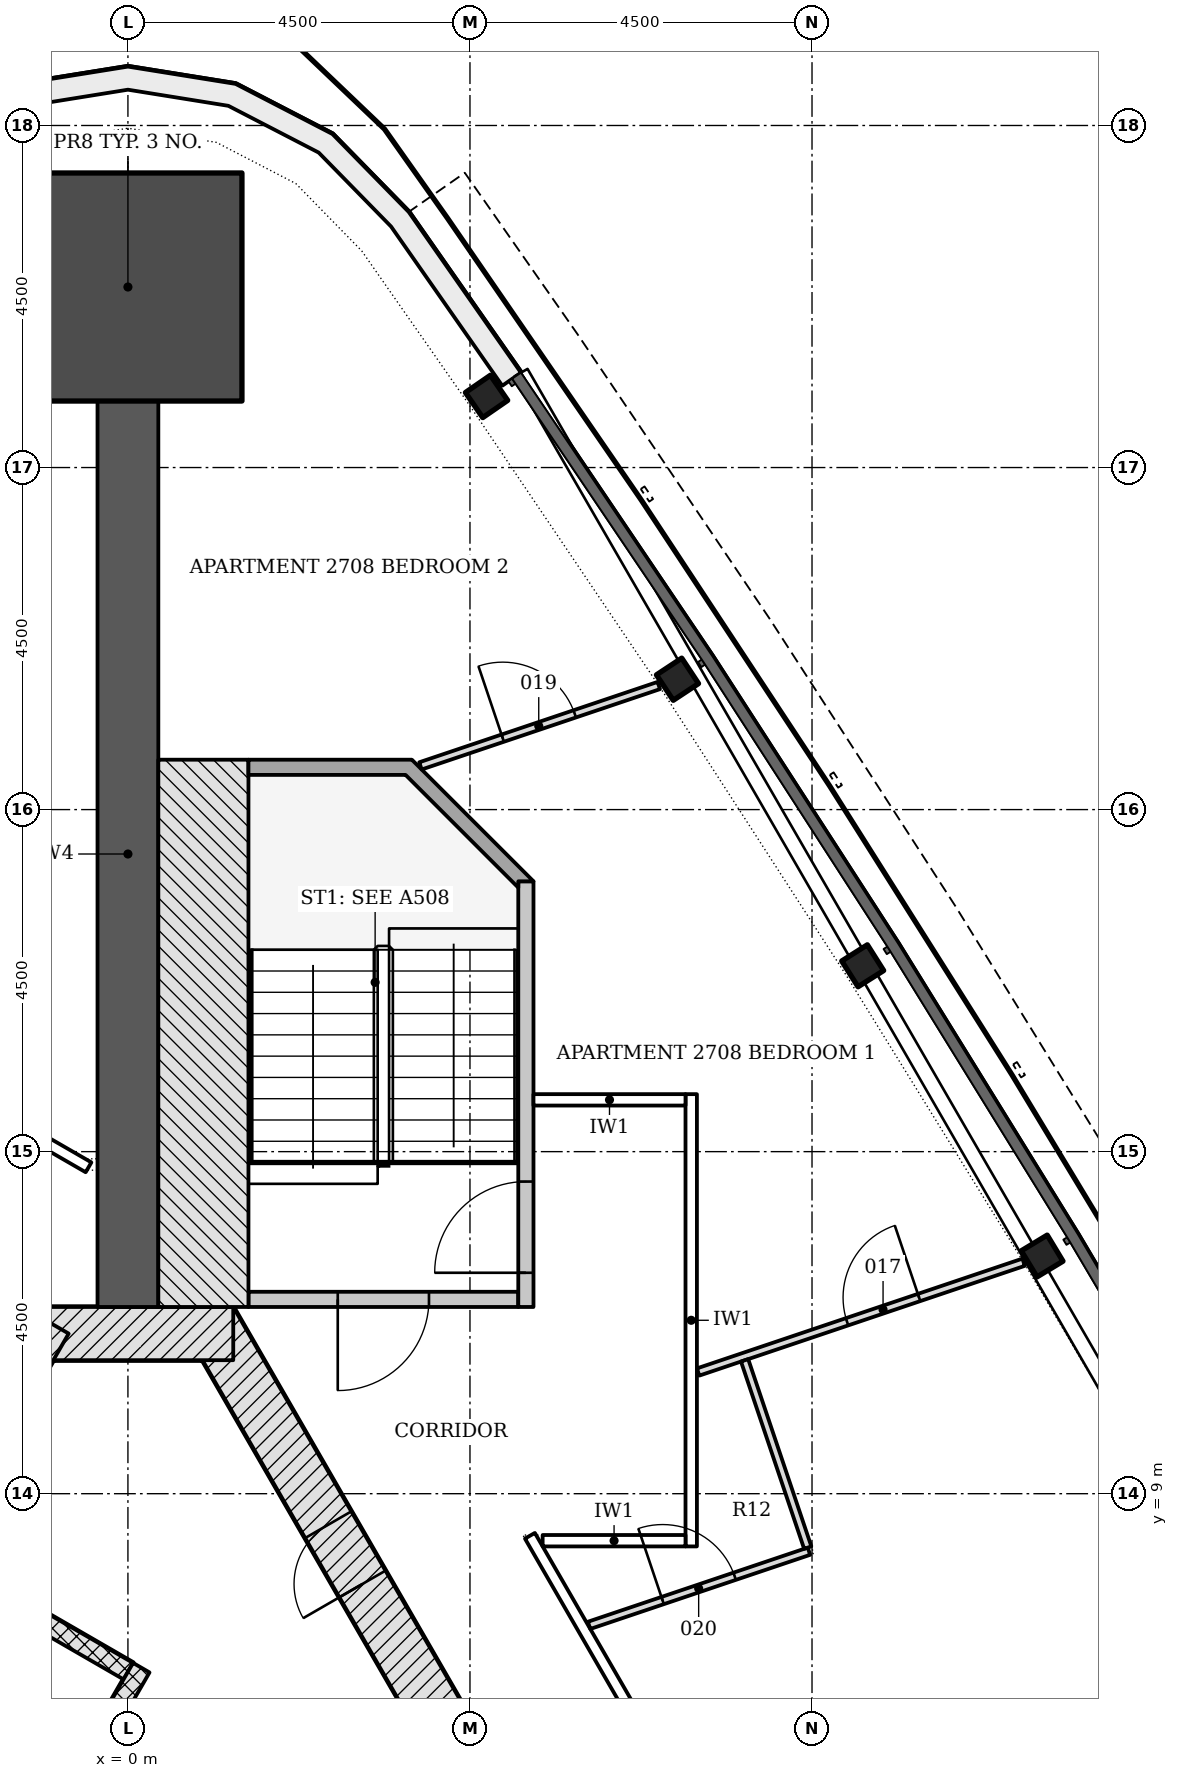
"""IFC4 building model, lengths in metres.
Left out: names, types, materials, properties, quantities, classifications, styles, units other than length and angle.
Written with IfcOpenShell. Run it as: python <this file> out.ifc"""

import sys

from ifc_helpers import new_model, si_unit, direction, frame, frame_2d, origin, origin_2d, place, context, subcontext, project, spatial, polyline, rectangle, i_section, outline, extrude, element, fill, save


model = new_model("IFC4")
c1 = context("Model", 3, precision=1e-05, world=origin(), true_north=direction((0.0, 1.0)))
c2 = subcontext(c1, "Body", "Model", "MODEL_VIEW")
j1 = project(units=[si_unit("LENGTHUNIT", "METRE"), si_unit("PLANEANGLEUNIT", "RADIAN")], contexts=[c1])
p1 = place(None, origin())
s1 = spatial("IfcSite", under=j1, at=p1, CompositionType="ELEMENT")
p2 = place(p1, origin())
s2 = spatial("IfcBuilding", under=s1, at=p2, CompositionType="ELEMENT")
p3 = place(p2, frame((0.0, 0.0, 105.9)))
s3 = spatial("IfcBuildingStorey", under=s2, at=p3, CompositionType="ELEMENT", Elevation=105.9)
p4 = place(p3, frame((10.311, -4.703, -0.2), z_axis=(0.0, 0.0, 1.0), x_axis=(-0.500001446645, 0.866024568562, 0.0)))
e1 = element("IfcWall", 1, at=p4, inside=s3, PredefinedType="SHEAR", context=c2, shape_type="SweptSolid", body=[
    extrude(rectangle(XDim=18.458, YDim=0.7, at=frame_2d((9.229, 0.0))), origin(), (0.0, 0.0, 1.0), 3.6),
])
p5 = place(p4, frame((10.5, 0.0, 0.2)))
e2 = element("IfcOpeningElement", 2, at=p5, cuts=e1, PredefinedType="OPENING", context=c2, shape_type="SweptSolid", body=[
    extrude(rectangle(XDim=1.0, YDim=2.1, at=frame_2d((0.5, 1.05))), frame((0.0, 0.36, 0.0), z_axis=(0.0, -1.0, 0.0), x_axis=(1.0, 0.0, 0.0)), (0.0, 0.0, 1.0), 0.72),
])
p6 = place(p4, frame((4.877, 0.0, 0.2)))
e3 = element("IfcOpeningElement", 3, at=p6, cuts=e1, PredefinedType="OPENING", context=c2, shape_type="SweptSolid", body=[
    extrude(rectangle(XDim=0.9, YDim=2.1, at=frame_2d((0.45, 1.05))), frame((0.0, 0.36, 0.0), z_axis=(0.0, -1.0, 0.0), x_axis=(1.0, 0.0, 0.0)), (0.0, 0.0, 1.0), 0.72),
])
p7 = place(p4, frame((14.452, 0.0, 0.2)))
e4 = element("IfcOpeningElement", 4, at=p7, cuts=e1, PredefinedType="OPENING", context=c2, shape_type="SweptSolid", body=[
    extrude(rectangle(XDim=0.9, YDim=2.1, at=frame_2d((0.45, 1.05))), frame((0.0, 0.36, 0.0), z_axis=(0.0, -1.0, 0.0), x_axis=(1.0, 0.0, 0.0)), (0.0, 0.0, 1.0), 0.72),
])
p8 = place(p3, frame((1.386, 11.106, -0.2), z_axis=(0.0, 0.0, 1.0), x_axis=(-1.0, 0.0, 0.0)))
e5 = element("IfcWall", 5, at=p8, inside=s3, PredefinedType="SHEAR", context=c2, shape_type="SweptSolid", body=[
    extrude(rectangle(XDim=2.771, YDim=0.7, at=frame_2d((1.386, 0.0))), origin(), (0.0, 0.0, 1.0), 3.6),
])
p9 = place(p3, frame((-1.083, 11.281, -0.2), z_axis=(0.0, 0.0, 1.0), x_axis=(-0.500001446645, -0.866024568562, 0.0)))
e6 = element("IfcWall", 6, at=p9, inside=s3, PredefinedType="SHEAR", context=c2, shape_type="SweptSolid", body=[
    extrude(rectangle(XDim=18.458, YDim=0.7, at=frame_2d((9.229, 0.0))), origin(), (0.0, 0.0, 1.0), 3.6),
])
p10 = place(p9, frame((8.979, 0.0, 0.2)))
e7 = element("IfcOpeningElement", 7, at=p10, cuts=e6, PredefinedType="OPENING", context=c2, shape_type="SweptSolid", body=[
    extrude(rectangle(XDim=1.2, YDim=2.1, at=frame_2d((0.6, 1.05))), frame((0.0, 0.36, 0.0), z_axis=(0.0, -1.0, 0.0), x_axis=(1.0, 0.0, 0.0)), (0.0, 0.0, 1.0), 0.72),
])
p11 = place(p9, frame((11.029, 0.0, 0.2)))
e8 = element("IfcOpeningElement", 8, at=p11, cuts=e6, PredefinedType="OPENING", context=c2, shape_type="SweptSolid", body=[
    extrude(rectangle(XDim=1.2, YDim=2.1, at=frame_2d((0.6, 1.05))), frame((0.0, 0.36, 0.0), z_axis=(0.0, -1.0, 0.0), x_axis=(1.0, 0.0, 0.0)), (0.0, 0.0, 1.0), 0.72),
])
p12 = place(p3, frame((0.0, 11.456, -0.2), z_axis=(0.0, 0.0, 1.0), x_axis=(0.0, 1.0, 0.0)))
e9 = element("IfcWall", 9, at=p12, inside=s3, PredefinedType="SHEAR", context=c2, shape_type="SweptSolid", body=[
    extrude(rectangle(XDim=11.919, YDim=0.8, at=frame_2d((5.959, 0.0))), origin(), (0.0, 0.0, 1.0), 3.6),
])
p13 = place(p3, frame((0.0, 24.875, -0.2), z_axis=(0.0, 0.0, 1.0), x_axis=(0.0, 1.0, 0.0)))
e10 = element("IfcColumn", 10, at=p13, inside=s3, PredefinedType="COLUMN", context=c2, shape_type="SweptSolid", body=[
    extrude(rectangle(XDim=3.0, YDim=3.0, at=origin_2d()), origin(), (0.0, 0.0, 1.0), 3.6),
])
for number, where, z_axis, x_axis in (
    (11, (12.027, 12.127, -0.2), (0.0, 0.0, 1.0), (-0.517, 0.856, 0.0)),
    (12, (9.667, 15.945, -0.2), (0.0, 0.0, 1.0), (-0.534, 0.845, 0.0)),
    (13, (7.23, 19.715, -0.2), (0.0, 0.0, 1.0), (-0.551, 0.834, 0.0)),
    (14, (4.718, 23.435, -0.2), (0.0, 0.0, 1.0), (-0.568, 0.823, 0.0)),
):
    element("IfcColumn", number, at=place(p3, frame(where, z_axis=z_axis, x_axis=x_axis)), inside=s3, PredefinedType="COLUMN", context=c2, shape_type="SweptSolid", body=[
        extrude(i_section(OverallWidth=0.401, OverallDepth=0.399, WebThickness=0.025, FlangeThickness=0.04, FilletRadius=0.015, at=origin_2d()), origin(), (0.0, 0.0, 1.0), 3.6),
    ])
p14 = place(p3, origin())
e15 = element("IfcWall", 15, at=p14, inside=s3, PredefinedType="NOTDEFINED", context=c2, shape_type="SweptSolid", body=[
    extrude(outline(polyline([(5.171, 23.748), (3.694, 25.863), (2.69, 26.888), (1.417, 27.547), (0.0, 27.775), (-1.417, 27.547), (-2.69, 26.888), (-3.694, 25.863), (-5.171, 23.748), (-4.925, 23.576), (-3.462, 25.67), (-2.51, 26.644), (-1.321, 27.259), (0.0, 27.471), (1.321, 27.259), (2.51, 26.644), (3.462, 25.67), (4.925, 23.576), (5.171, 23.748)])), origin(), (0.0, 0.0, 1.0), 3.3),
])
p15 = place(p3, frame((-2.506, 8.115, -0.2), z_axis=(0.0, 0.0, 1.0), x_axis=(0.865996321171, -0.50005036918, 0.0)))
e16 = element("IfcWall", 16, at=p15, inside=s3, PredefinedType="PARTITIONING", context=c2, shape_type="SweptSolid", body=[
    extrude(rectangle(XDim=2.9, YDim=0.25, at=frame_2d((1.45, 0.0))), origin(), (0.0, 0.0, 1.0), 3.6),
])
p16 = place(p3, frame((0.176, 6.711, 0.0), z_axis=(0.0, 0.0, 1.0), x_axis=(-0.500004227369, -0.866022963098, 0.0)))
e17 = element("IfcWall", 17, at=p16, inside=s3, PredefinedType="PARTITIONING", context=c2, shape_type="SweptSolid", body=[
    extrude(rectangle(XDim=11.8, YDim=0.25, at=frame_2d((5.9, 0.0))), origin(), (0.0, 0.0, 1.0), 3.4),
])
p17 = place(p3, frame((5.135, 11.556, -0.2), z_axis=(0.0, 0.0, 1.0), x_axis=(-1.0, 0.0, 0.0)))
e18 = element("IfcWall", 18, at=p17, inside=s3, PredefinedType="SHEAR", context=c2, shape_type="SweptSolid", body=[
    extrude(rectangle(XDim=3.55, YDim=0.2, at=frame_2d((1.775, 0.0))), origin(), (0.0, 0.0, 1.0), 3.6),
])
p18 = place(p17, frame((1.175, 0.0, 0.2)))
e19 = element("IfcOpeningElement", 19, at=p18, cuts=e18, PredefinedType="OPENING", context=c2, shape_type="SweptSolid", body=[
    extrude(rectangle(XDim=1.2, YDim=2.1, at=frame_2d((0.6, 1.05))), frame((0.0, 0.11, 0.0), z_axis=(0.0, -1.0, 0.0), x_axis=(1.0, 0.0, 0.0)), (0.0, 0.0, 1.0), 0.22),
])
p19 = place(p3, frame((5.236, 11.456, -0.2), z_axis=(0.0, 0.0, 1.0), x_axis=(0.0, 1.0, 0.0)))
e20 = element("IfcWall", 20, at=p19, inside=s3, PredefinedType="SHEAR", context=c2, shape_type="SweptSolid", body=[
    extrude(rectangle(XDim=5.6, YDim=0.2, at=frame_2d((2.8, 0.0))), origin(), (0.0, 0.0, 1.0), 3.6),
])
p20 = place(p19, frame((0.45, 0.0, 0.2)))
e21 = element("IfcOpeningElement", 21, at=p20, cuts=e20, PredefinedType="OPENING", context=c2, shape_type="SweptSolid", body=[
    extrude(rectangle(XDim=1.2, YDim=2.1, at=frame_2d((0.6, 1.05))), frame((0.0, 0.11, 0.0), z_axis=(0.0, -1.0, 0.0), x_axis=(1.0, 0.0, 0.0)), (0.0, 0.0, 1.0), 0.22),
])
p21 = place(p3, frame((0.993, 11.456, -0.2), z_axis=(0.0, 0.0, 1.0), x_axis=(0.0, 1.0, 0.0)))
e22 = element("IfcWall", 22, at=p21, inside=s3, PredefinedType="SHEAR", context=c2, shape_type="SweptSolid", body=[
    extrude(rectangle(XDim=7.2, YDim=1.186, at=frame_2d((3.6, 0.0))), origin(), (0.0, 0.0, 1.0), 3.6),
])
p22 = place(p3, frame((0.0, 0.0, -0.2)))
e23 = element("IfcWall", 23, at=p22, inside=s3, PredefinedType="SHEAR", context=c2, shape_type="SweptSolid", body=[
    extrude(outline(polyline([(5.336, 17.056), (3.736, 18.656), (1.586, 18.656), (1.586, 18.456), (3.653, 18.456), (5.135, 16.974), (5.135, 17.056), (5.135, 17.056), (5.135, 17.056), (5.135, 17.056), (5.135, 17.056), (5.135, 17.056), (5.135, 17.056), (5.135, 17.056), (5.135, 17.056), (5.135, 17.056), (5.135, 17.056), (5.135, 17.056), (5.135, 17.056), (5.135, 17.056), (5.135, 17.056), (5.135, 17.056), (5.135, 17.056), (5.336, 17.056)])), origin(), (0.0, 0.0, 1.0), 3.6),
])
p23 = place(p3, frame((5.289, 8.446, 0.0), z_axis=(0.0, 0.0, 1.0), x_axis=(0.499996620721, -0.866027354803, 0.0)))
e24 = element("IfcWall", 24, at=p23, inside=s3, PredefinedType="PARTITIONING", context=c2, shape_type="SweptSolid", body=[
    extrude(rectangle(XDim=15.057, YDim=0.15, at=frame_2d((7.528, 0.0))), origin(), (0.0, 0.0, 1.0), 2.847),
])
p24 = place(p23, frame((10.689, 0.0, 0.0)))
e25 = element("IfcOpeningElement", 25, at=p24, cuts=e24, PredefinedType="OPENING", context=c2, shape_type="SweptSolid", body=[
    extrude(rectangle(XDim=1.0, YDim=2.1, at=frame_2d((0.5, 1.05))), frame((0.0, 0.085, 0.0), z_axis=(0.0, -1.0, 0.0), x_axis=(1.0, 0.0, 0.0)), (0.0, 0.0, 1.0), 0.17),
])
p25 = place(p23, frame((4.695, 0.0, 0.0)))
e26 = element("IfcOpeningElement", 26, at=p25, cuts=e24, PredefinedType="OPENING", context=c2, shape_type="SweptSolid", body=[
    extrude(rectangle(XDim=1.0, YDim=2.1, at=frame_2d((0.5, 1.05))), frame((0.0, 0.085, 0.0), z_axis=(0.0, -1.0, 0.0), x_axis=(1.0, 0.0, 0.0)), (0.0, 0.0, 1.0), 0.17),
])
p26 = place(p3, frame((7.411, 8.306, 0.0), z_axis=(0.0, 0.0, 1.0), x_axis=(0.0, 1.0, 0.0)))
e27 = element("IfcWall", 27, at=p26, inside=s3, PredefinedType="PARTITIONING", context=c2, shape_type="SweptSolid", body=[
    extrude(rectangle(XDim=5.95, YDim=0.15, at=frame_2d((2.975, 0.0))), origin(), (0.0, 0.0, 1.0), 2.847),
])
p27 = place(p3, frame((-5.093, 15.935, 0.0), z_axis=(0.0, 0.0, 1.0), x_axis=(0.866033195618, -0.499986503906, 0.0)))
e28 = element("IfcWall", 28, at=p27, inside=s3, PredefinedType="PARTITIONING", context=c2, shape_type="SweptSolid", body=[
    extrude(rectangle(XDim=5.282, YDim=0.15, at=frame_2d((2.641, 0.0))), origin(), (0.0, 0.0, 1.0), 3.4),
])
p28 = place(p27, frame((1.816, 0.0, 0.0)))
e29 = element("IfcOpeningElement", 29, at=p28, cuts=e28, PredefinedType="OPENING", context=c2, shape_type="SweptSolid", body=[
    extrude(rectangle(XDim=1.5, YDim=2.1, at=frame_2d((0.75, 1.05))), frame((0.0, 0.085, 0.0), z_axis=(0.0, -1.0, 0.0), x_axis=(1.0, 0.0, 0.0)), (0.0, 0.0, 1.0), 0.17),
])
p29 = place(p3, frame((5.336, 14.181, 0.0), z_axis=(0.0, 0.0, 1.0), x_axis=(1.0, 0.0, 0.0)))
e30 = element("IfcWall", 30, at=p29, inside=s3, PredefinedType="PARTITIONING", context=c2, shape_type="SweptSolid", body=[
    extrude(rectangle(XDim=2.0, YDim=0.15, at=frame_2d((1.0, 0.0))), origin(), (0.0, 0.0, 1.0), 2.923),
])
p30 = place(p3, frame((5.456, 8.381, 0.0), z_axis=(0.0, 0.0, 1.0), x_axis=(1.0, 0.0, 0.0)))
e31 = element("IfcWall", 31, at=p30, inside=s3, PredefinedType="PARTITIONING", context=c2, shape_type="SweptSolid", body=[
    extrude(rectangle(XDim=1.88, YDim=0.15, at=frame_2d((0.94, 0.0))), origin(), (0.0, 0.0, 1.0), 2.847),
])
p31 = place(p3, frame((7.502, 10.601, 0.0), z_axis=(0.0, 0.0, 1.0), x_axis=(0.947570000993, 0.319548264303, 0.0)))
e32 = element("IfcWall", 32, at=p31, inside=s3, PredefinedType="PARTITIONING", context=c2, shape_type="SweptSolid", body=[
    extrude(rectangle(XDim=4.519, YDim=0.1, at=frame_2d((2.26, 0.0))), origin(), (0.0, 0.0, 1.0), 2.847),
])
p32 = place(p31, frame((2.068, 0.0, 0.0)))
e33 = element("IfcOpeningElement", 33, at=p32, cuts=e32, PredefinedType="OPENING", context=c2, shape_type="SweptSolid", body=[
    extrude(rectangle(XDim=1.0, YDim=2.1, at=frame_2d((0.5, 1.05))), frame((0.0, 0.06, 0.0), z_axis=(0.0, -1.0, 0.0), x_axis=(1.0, 0.0, 0.0)), (0.0, 0.0, 1.0), 0.12),
])
p33 = place(p3, frame((3.849, 18.575, 0.0), z_axis=(0.0, 0.0, 1.0), x_axis=(0.947578304543, 0.319523640375, 0.0)))
e34 = element("IfcWall", 34, at=p33, inside=s3, PredefinedType="PARTITIONING", context=c2, shape_type="SweptSolid", body=[
    extrude(rectangle(XDim=3.309, YDim=0.1, at=frame_2d((1.655, 0.0))), origin(), (0.0, 0.0, 1.0), 2.974),
])
p34 = place(p33, frame((1.142, 0.0, 0.0)))
e35 = element("IfcOpeningElement", 35, at=p34, cuts=e34, PredefinedType="OPENING", context=c2, shape_type="SweptSolid", body=[
    extrude(rectangle(XDim=1.0, YDim=2.1, at=frame_2d((0.5, 1.05))), frame((0.0, 0.06, 0.0), z_axis=(0.0, -1.0, 0.0), x_axis=(1.0, 0.0, 0.0)), (0.0, 0.0, 1.0), 0.12),
])
p35 = place(p3, frame((6.067, 7.268, 0.0), z_axis=(0.0, 0.0, 1.0), x_axis=(0.94756585242, 0.319560565978, 0.0)))
e36 = element("IfcWall", 36, at=p35, inside=s3, PredefinedType="PARTITIONING", context=c2, shape_type="SweptSolid", body=[
    extrude(rectangle(XDim=3.053, YDim=0.1, at=frame_2d((1.526, 0.0))), origin(), (0.0, 0.0, 1.0), 3.4),
])
p36 = place(p35, frame((1.021, 0.0, 0.0)))
e37 = element("IfcOpeningElement", 37, at=p36, cuts=e36, PredefinedType="OPENING", context=c2, shape_type="SweptSolid", body=[
    extrude(rectangle(XDim=1.0, YDim=2.1, at=frame_2d((0.5, 1.05))), frame((0.0, 0.06, 0.0), z_axis=(0.0, -1.0, 0.0), x_axis=(1.0, 0.0, 0.0)), (0.0, 0.0, 1.0), 0.12),
])
p37 = place(p3, frame((8.113, 10.754, 0.0), z_axis=(0.0, 0.0, 1.0), x_axis=(0.31954997077, -0.94756942552, 0.0)))
e38 = element("IfcWall", 38, at=p37, inside=s3, PredefinedType="PARTITIONING", context=c2, shape_type="SweptSolid", body=[
    extrude(rectangle(XDim=2.6, YDim=0.1, at=frame_2d((1.3, 0.0))), origin(), (0.0, 0.0, 1.0), 2.847),
])
p38 = place(p7, origin())
e39 = element("IfcDoor", 39, at=p38, inside=s3, OperationType="SINGLE_SWING_LEFT", PredefinedType="DOOR", context=c2, shape_type="SweptSolid", body=[
    extrude(rectangle(XDim=0.9, YDim=2.1, at=frame_2d((0.45, 1.05))), frame((0.0, 0.075, 0.0), z_axis=(0.0, -1.0, 0.0), x_axis=(1.0, 0.0, 0.0)), (0.0, 0.0, 1.0), 0.15),
])
fill(e4, e39)
p39 = place(p18, origin())
e40 = element("IfcDoor", 40, at=p39, inside=s3, OperationType="SINGLE_SWING_RIGHT", PredefinedType="DOOR", context=c2, shape_type="SweptSolid", body=[
    extrude(rectangle(XDim=1.2, YDim=2.1, at=frame_2d((0.6, 1.05))), frame((0.0, 0.025, 0.0), z_axis=(0.0, -1.0, 0.0), x_axis=(1.0, 0.0, 0.0)), (0.0, 0.0, 1.0), 0.05),
])
fill(e19, e40)
p40 = place(p20, origin())
e41 = element("IfcDoor", 41, at=p40, inside=s3, OperationType="SINGLE_SWING_LEFT", PredefinedType="DOOR", context=c2, shape_type="SweptSolid", body=[
    extrude(rectangle(XDim=1.2, YDim=2.1, at=frame_2d((0.6, 1.05))), frame((0.0, 0.025, 0.0), z_axis=(0.0, -1.0, 0.0), x_axis=(1.0, 0.0, 0.0)), (0.0, 0.0, 1.0), 0.05),
])
fill(e21, e41)
p41 = place(p32, origin())
e42 = element("IfcDoor", 42, at=p41, inside=s3, OperationType="SINGLE_SWING_RIGHT", PredefinedType="DOOR", context=c2, shape_type="SweptSolid", body=[
    extrude(rectangle(XDim=1.0, YDim=2.1, at=frame_2d((0.5, 1.05))), frame((0.0, 0.025, 0.0), z_axis=(0.0, -1.0, 0.0), x_axis=(1.0, 0.0, 0.0)), (0.0, 0.0, 1.0), 0.05),
])
fill(e33, e42)
p42 = place(p34, origin())
e43 = element("IfcDoor", 43, at=p42, inside=s3, OperationType="SINGLE_SWING_LEFT", PredefinedType="DOOR", context=c2, shape_type="SweptSolid", body=[
    extrude(rectangle(XDim=1.0, YDim=2.1, at=frame_2d((0.5, 1.05))), frame((0.0, 0.025, 0.0), z_axis=(0.0, -1.0, 0.0), x_axis=(1.0, 0.0, 0.0)), (0.0, 0.0, 1.0), 0.05),
])
fill(e35, e43)
p43 = place(p36, origin())
e44 = element("IfcDoor", 44, at=p43, inside=s3, OperationType="SINGLE_SWING_LEFT", PredefinedType="DOOR", context=c2, shape_type="SweptSolid", body=[
    extrude(rectangle(XDim=1.0, YDim=2.1, at=frame_2d((0.5, 1.05))), frame((0.0, 0.025, 0.0), z_axis=(0.0, -1.0, 0.0), x_axis=(1.0, 0.0, 0.0)), (0.0, 0.0, 1.0), 0.05),
])
fill(e37, e44)
save(model, sys.argv[1])
